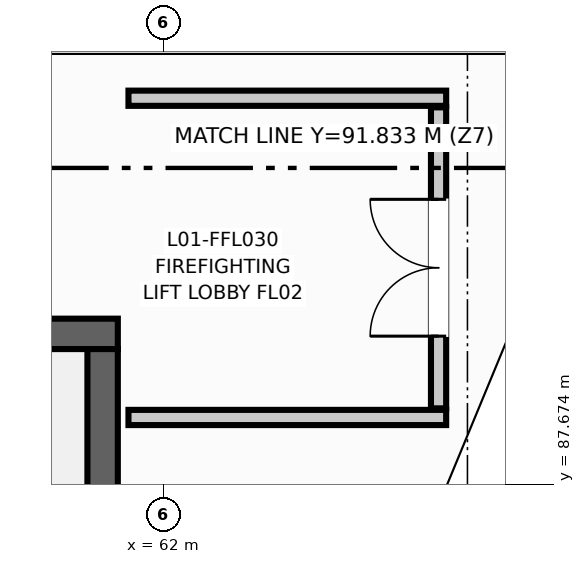
"""IFC4 building model, lengths in metres.
Left out: names, types, materials, properties, quantities, classifications, styles, units other than length and angle.
Written with IfcOpenShell. Run it as: python <this file> out.ifc"""

import sys

from ifc_helpers import new_model, si_unit, direction, frame, frame_2d, origin, place, context, subcontext, project, spatial, rectangle, extrude, element, fill, save


model = new_model("IFC4")
c1 = context("Model", 3, precision=1e-05, world=origin(), true_north=direction((0.0, 1.0)))
c2 = subcontext(c1, "Body", "Model", "MODEL_VIEW")
j1 = project(units=[si_unit("LENGTHUNIT", "METRE"), si_unit("PLANEANGLEUNIT", "RADIAN")], contexts=[c1])
p1 = place(None, origin())
s1 = spatial("IfcSite", under=j1, at=p1, CompositionType="ELEMENT")
p2 = place(p1, origin())
s2 = spatial("IfcBuilding", under=s1, at=p2, CompositionType="ELEMENT")
p3 = place(p2, frame((0.0, 0.0, 4.5)))
s3 = spatial("IfcBuildingStorey", under=s2, at=p3, CompositionType="ELEMENT", Elevation=4.5)
p4 = place(p3, frame((55.6, 89.65, 0.0), z_axis=(0.0, 0.0, 1.0), x_axis=(1.0, 0.0, 0.0)))
e1 = element("IfcWall", 1, at=p4, inside=s3, PredefinedType="SHEAR", context=c2, shape_type="SweptSolid", body=[
    extrude(rectangle(XDim=5.8, YDim=0.4, at=frame_2d((2.9, 0.0))), origin(), (0.0, 0.0, 1.0), 4.25),
])
p5 = place(p3, frame((61.2, 80.55, 0.0), z_axis=(0.0, 0.0, 1.0), x_axis=(0.0, 1.0, 0.0)))
e2 = element("IfcWall", 2, at=p5, inside=s3, PredefinedType="SHEAR", context=c2, shape_type="SweptSolid", body=[
    extrude(rectangle(XDim=8.9, YDim=0.4, at=frame_2d((4.45, 0.0))), origin(), (0.0, 0.0, 1.0), 4.25),
])
p6 = place(p5, frame((0.4, 0.0, 0.0)))
e3 = element("IfcOpeningElement", 3, at=p6, cuts=e2, PredefinedType="OPENING", context=c2, shape_type="SweptSolid", body=[
    extrude(rectangle(XDim=1.2, YDim=2.2, at=frame_2d((0.6, 1.1))), frame((0.0, 0.21, 0.0), z_axis=(0.0, -1.0, 0.0), x_axis=(1.0, 0.0, 0.0)), (0.0, 0.0, 1.0), 0.42),
])
for number, where, z_axis, x_axis in (
    (4, (61.54, 88.55, 0.0), (0.0, 0.0, 1.0), (1.0, 0.0, 0.0)),
    (5, (61.54, 92.75, 0.0), (0.0, 0.0, 1.0), (1.0, 0.0, 0.0)),
):
    element("IfcWall", number, at=place(p3, frame(where, z_axis=z_axis, x_axis=x_axis)), inside=s3, PredefinedType="PARTITIONING", context=c2, shape_type="SweptSolid", body=[
        extrude(rectangle(XDim=4.18, YDim=0.2, at=frame_2d((2.09, 0.0))), origin(), (0.0, 0.0, 1.0), 3.22),
    ])
p7 = place(p3, frame((65.62, 88.67, 0.0), z_axis=(0.0, 0.0, 1.0), x_axis=(0.0, 1.0, 0.0)))
e6 = element("IfcWall", 6, at=p7, inside=s3, PredefinedType="PARTITIONING", context=c2, shape_type="SweptSolid", body=[
    extrude(rectangle(XDim=3.96, YDim=0.2, at=frame_2d((1.98, 0.0))), origin(), (0.0, 0.0, 1.0), 3.22),
])
p8 = place(p7, frame((0.95, 0.0, 0.0)))
e7 = element("IfcOpeningElement", 7, at=p8, cuts=e6, PredefinedType="OPENING", context=c2, shape_type="SweptSolid", body=[
    extrude(rectangle(XDim=1.8, YDim=2.2, at=frame_2d((0.9, 1.1))), frame((0.0, 0.11, 0.0), z_axis=(0.0, -1.0, 0.0), x_axis=(1.0, 0.0, 0.0)), (0.0, 0.0, 1.0), 0.22),
])
p9 = place(p8, origin())
e8 = element("IfcDoor", 8, at=p9, inside=s3, OperationType="DOUBLE_DOOR_SINGLE_SWING", PredefinedType="DOOR", context=c2, shape_type="SweptSolid", body=[
    extrude(rectangle(XDim=1.8, YDim=2.2, at=frame_2d((0.9, 1.1))), frame((0.0, 0.025, 0.0), z_axis=(0.0, -1.0, 0.0), x_axis=(1.0, 0.0, 0.0)), (0.0, 0.0, 1.0), 0.05),
])
fill(e7, e8)
save(model, sys.argv[1])
